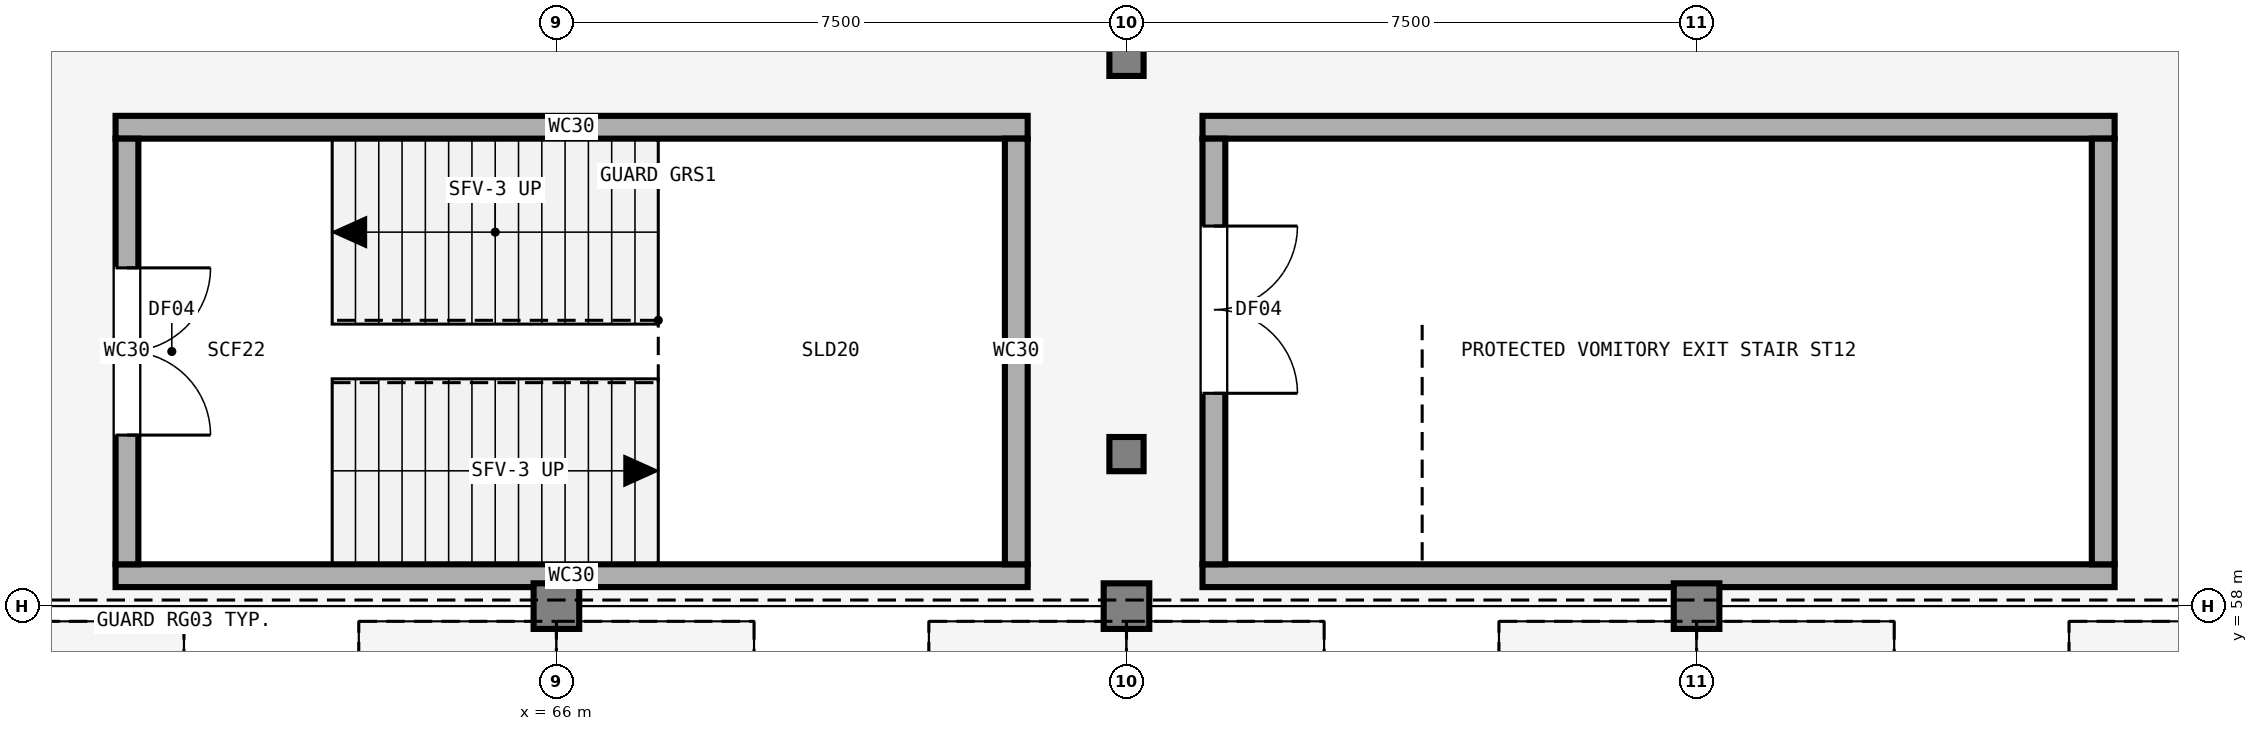
"""IFC4 building model, lengths in metres.
Left out: names, types, materials, properties, quantities, classifications, styles, units other than length and angle.
Written with IfcOpenShell. Run it as: python <this file> out.ifc"""

import sys

from ifc_helpers import new_model, si_unit, direction, frame, frame_2d, origin, origin_2d, place, context, subcontext, project, spatial, rectangle, extrude, element, fill, save


model = new_model("IFC4")
c1 = context("Model", 3, precision=1e-05, world=origin(), true_north=direction((0.0, 1.0)))
c2 = subcontext(c1, "Body", "Model", "MODEL_VIEW")
j1 = project(units=[si_unit("LENGTHUNIT", "METRE"), si_unit("PLANEANGLEUNIT", "RADIAN")], contexts=[c1])
p1 = place(None, origin())
s1 = spatial("IfcSite", under=j1, at=p1, CompositionType="ELEMENT")
p2 = place(p1, origin())
s2 = spatial("IfcBuilding", under=s1, at=p2, CompositionType="ELEMENT")
p3 = place(p2, frame((0.0, 0.0, 4.8)))
s3 = spatial("IfcBuildingStorey", under=s2, at=p3, CompositionType="ELEMENT", Elevation=4.8)
for number, where, z_axis, x_axis in (
    (1, (66.0, 58.0, 0.0), (0.0, 0.0, 1.0), (1.0, 0.0, 0.0)),
    (2, (73.5, 58.0, 0.0), (0.0, 0.0, 1.0), (1.0, 0.0, 0.0)),
    (3, (81.0, 58.0, 0.0), (0.0, 0.0, 1.0), (1.0, 0.0, 0.0)),
):
    element("IfcColumn", number, at=place(p3, frame(where, z_axis=z_axis, x_axis=x_axis)), inside=s3, PredefinedType="COLUMN", context=c2, shape_type="SweptSolid", body=[
        extrude(rectangle(XDim=0.6, YDim=0.6, at=origin_2d()), origin(), (0.0, 0.0, 1.0), 4.5),
    ])
for number, where, z_axis, x_axis in (
    (4, (73.5, 60.0, 0.0), (0.0, 0.0, 1.0), (1.0, 0.0, 0.0)),
    (5, (73.5, 65.2, 0.0), (0.0, 0.0, 1.0), (1.0, 0.0, 0.0)),
):
    element("IfcColumn", number, at=place(p3, frame(where, z_axis=z_axis, x_axis=x_axis)), inside=s3, PredefinedType="COLUMN", context=c2, shape_type="SweptSolid", body=[
        extrude(rectangle(XDim=0.45, YDim=0.45, at=origin_2d()), origin(), (0.0, 0.0, 1.0), 2.805),
    ])
for number, where, z_axis, x_axis in (
    (6, (60.2, 58.4, 0.0), (0.0, 0.0, 1.0), (1.0, 0.0, 0.0)),
    (7, (72.2, 64.3, 0.0), (0.0, 0.0, 1.0), (-1.0, 0.0, 0.0)),
):
    element("IfcWall", number, at=place(p3, frame(where, z_axis=z_axis, x_axis=x_axis)), inside=s3, PredefinedType="SHEAR", context=c2, shape_type="SweptSolid", body=[
        extrude(rectangle(XDim=12.0, YDim=0.3, at=frame_2d((6.0, 0.0))), origin(), (0.0, 0.0, 1.0), 4.5),
    ])
p4 = place(p3, frame((60.35, 64.15, 0.0), z_axis=(0.0, 0.0, 1.0), x_axis=(0.0, -1.0, 0.0)))
e8 = element("IfcWall", 8, at=p4, inside=s3, PredefinedType="SHEAR", context=c2, shape_type="SweptSolid", body=[
    extrude(rectangle(XDim=5.6, YDim=0.3, at=frame_2d((2.8, 0.0))), origin(), (0.0, 0.0, 1.0), 4.5),
])
p5 = place(p4, frame((1.7, 0.0, 0.0)))
e9 = element("IfcOpeningElement", 9, at=p5, cuts=e8, PredefinedType="OPENING", context=c2, shape_type="SweptSolid", body=[
    extrude(rectangle(XDim=2.2, YDim=2.25, at=frame_2d((1.1, 1.125))), frame((0.0, 0.16, 0.0), z_axis=(0.0, -1.0, 0.0), x_axis=(1.0, 0.0, 0.0)), (0.0, 0.0, 1.0), 0.32),
])
p6 = place(p3, frame((72.05, 58.55, 0.0), z_axis=(0.0, 0.0, 1.0), x_axis=(0.0, 1.0, 0.0)))
e10 = element("IfcWall", 10, at=p6, inside=s3, PredefinedType="SHEAR", context=c2, shape_type="SweptSolid", body=[
    extrude(rectangle(XDim=5.6, YDim=0.3, at=frame_2d((2.8, 0.0))), origin(), (0.0, 0.0, 1.0), 4.5),
])
for number, where, z_axis, x_axis in (
    (11, (74.5, 58.4, 0.0), (0.0, 0.0, 1.0), (1.0, 0.0, 0.0)),
    (12, (86.5, 64.3, 0.0), (0.0, 0.0, 1.0), (-1.0, 0.0, 0.0)),
):
    element("IfcWall", number, at=place(p3, frame(where, z_axis=z_axis, x_axis=x_axis)), inside=s3, PredefinedType="SHEAR", context=c2, shape_type="SweptSolid", body=[
        extrude(rectangle(XDim=12.0, YDim=0.3, at=frame_2d((6.0, 0.0))), origin(), (0.0, 0.0, 1.0), 3.4),
    ])
p7 = place(p3, frame((74.65, 64.15, 0.0), z_axis=(0.0, 0.0, 1.0), x_axis=(0.0, -1.0, 0.0)))
e13 = element("IfcWall", 13, at=p7, inside=s3, PredefinedType="SHEAR", context=c2, shape_type="SweptSolid", body=[
    extrude(rectangle(XDim=5.6, YDim=0.3, at=frame_2d((2.8, 0.0))), origin(), (0.0, 0.0, 1.0), 3.4),
])
p8 = place(p7, frame((1.15, 0.0, 0.0)))
e14 = element("IfcOpeningElement", 14, at=p8, cuts=e13, PredefinedType="OPENING", context=c2, shape_type="SweptSolid", body=[
    extrude(rectangle(XDim=2.2, YDim=2.25, at=frame_2d((1.1, 1.125))), frame((0.0, 0.16, 0.0), z_axis=(0.0, -1.0, 0.0), x_axis=(1.0, 0.0, 0.0)), (0.0, 0.0, 1.0), 0.32),
])
p9 = place(p3, frame((86.35, 58.55, 0.0), z_axis=(0.0, 0.0, 1.0), x_axis=(0.0, 1.0, 0.0)))
e15 = element("IfcWall", 15, at=p9, inside=s3, PredefinedType="SHEAR", context=c2, shape_type="SweptSolid", body=[
    extrude(rectangle(XDim=5.6, YDim=0.3, at=frame_2d((2.8, 0.0))), origin(), (0.0, 0.0, 1.0), 3.4),
])
p10 = place(p5, origin())
e16 = element("IfcDoor", 16, at=p10, inside=s3, OperationType="DOUBLE_DOOR_SINGLE_SWING", PredefinedType="DOOR", context=c2, shape_type="SweptSolid", body=[
    extrude(rectangle(XDim=2.2, YDim=2.25, at=frame_2d((1.1, 1.125))), frame((0.0, 0.025, 0.0), z_axis=(0.0, -1.0, 0.0), x_axis=(1.0, 0.0, 0.0)), (0.0, 0.0, 1.0), 0.05),
])
fill(e9, e16)
p11 = place(p8, origin())
e17 = element("IfcDoor", 17, at=p11, inside=s3, OperationType="DOUBLE_DOOR_SINGLE_SWING", PredefinedType="DOOR", context=c2, shape_type="SweptSolid", body=[
    extrude(rectangle(XDim=2.2, YDim=2.25, at=frame_2d((1.1, 1.125))), frame((0.0, 0.025, 0.0), z_axis=(0.0, -1.0, 0.0), x_axis=(1.0, 0.0, 0.0)), (0.0, 0.0, 1.0), 0.05),
])
fill(e14, e17)
save(model, sys.argv[1])
